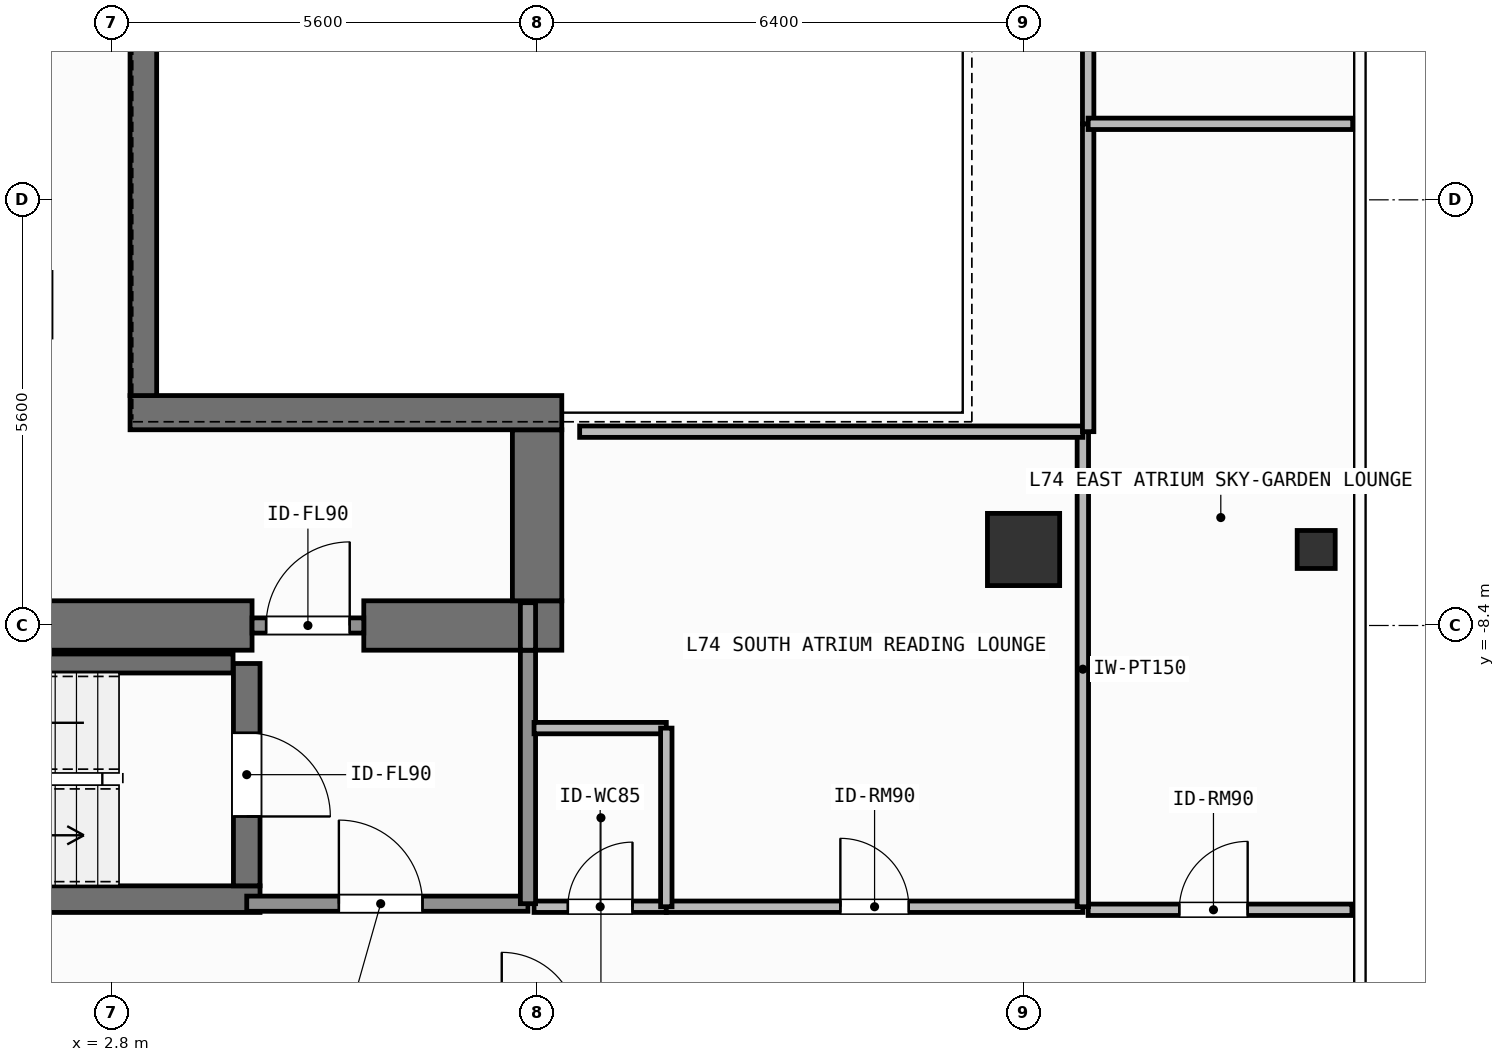
"""IFC4 building model, lengths in metres.
Left out: names, types, materials, properties, quantities, classifications, styles, units other than length and angle.
Written with IfcOpenShell. Run it as: python <this file> out.ifc"""

import sys

from ifc_helpers import new_model, si_unit, direction, frame, frame_2d, origin, origin_2d, place, context, subcontext, project, spatial, rectangle, hollow_rectangle, extrude, element, fill, save


model = new_model("IFC4")
c1 = context("Model", 3, precision=1e-05, world=origin(), true_north=direction((0.0, 1.0)))
c2 = subcontext(c1, "Body", "Model", "MODEL_VIEW")
j1 = project(units=[si_unit("LENGTHUNIT", "METRE"), si_unit("PLANEANGLEUNIT", "RADIAN")], contexts=[c1])
p1 = place(None, origin())
s1 = spatial("IfcSite", under=j1, at=p1, CompositionType="ELEMENT")
p2 = place(p1, origin())
s2 = spatial("IfcBuilding", under=s1, at=p2, CompositionType="ELEMENT")
p3 = place(p2, frame((0.0, 0.0, 301.5)))
s3 = spatial("IfcBuildingStorey", under=s2, at=p3, CompositionType="ELEMENT", Elevation=301.5)
p4 = place(p3, frame((-2.62, -8.4, 0.0), z_axis=(0.0, 0.0, 1.0), x_axis=(1.0, 0.0, 0.0)))
e1 = element("IfcWall", 1, at=p4, inside=s3, PredefinedType="SHEAR", context=c2, shape_type="SweptSolid", body=[
    extrude(rectangle(XDim=7.27, YDim=0.65, at=frame_2d((3.635, 0.0))), origin(), (0.0, 0.0, 1.0), 3.9),
])
p5 = place(p3, frame((6.12, -8.4, 0.0), z_axis=(0.0, 0.0, 1.0), x_axis=(1.0, 0.0, 0.0)))
e2 = element("IfcWall", 2, at=p5, inside=s3, PredefinedType="SHEAR", context=c2, shape_type="SweptSolid", body=[
    extrude(rectangle(XDim=2.605, YDim=0.65, at=frame_2d((1.302, 0.0))), origin(), (0.0, 0.0, 1.0), 3.9),
])
p6 = place(p3, frame((8.4, -8.075, 0.0), z_axis=(0.0, 0.0, 1.0), x_axis=(0.0, 1.0, 0.0)))
e3 = element("IfcWall", 3, at=p6, inside=s3, PredefinedType="SHEAR", context=c2, shape_type="SweptSolid", body=[
    extrude(rectangle(XDim=2.25, YDim=0.65, at=frame_2d((1.125, 0.0))), origin(), (0.0, 0.0, 1.0), 3.9),
])
p7 = place(p3, frame((3.045, -5.6, 0.0), z_axis=(0.0, 0.0, 1.0), x_axis=(1.0, 0.0, 0.0)))
e4 = element("IfcWall", 4, at=p7, inside=s3, PredefinedType="SHEAR", context=c2, shape_type="SweptSolid", body=[
    extrude(rectangle(XDim=5.68, YDim=0.45, at=frame_2d((2.84, 0.0))), origin(), (0.0, 0.0, 1.0), 3.9),
])
p8 = place(p3, frame((3.22, -5.375, 0.0), z_axis=(0.0, 0.0, 1.0), x_axis=(0.0, 1.0, 0.0)))
e5 = element("IfcWall", 5, at=p8, inside=s3, PredefinedType="SHEAR", context=c2, shape_type="SweptSolid", body=[
    extrude(rectangle(XDim=10.75, YDim=0.35, at=frame_2d((5.375, 0.0))), origin(), (0.0, 0.0, 1.0), 3.9),
])
p9 = place(p3, frame((-2.555, -12.0, 0.0), z_axis=(0.0, 0.0, 1.0), x_axis=(1.0, 0.0, 0.0)))
e6 = element("IfcWall", 6, at=p9, inside=s3, PredefinedType="SHEAR", context=c2, shape_type="SweptSolid", body=[
    extrude(rectangle(XDim=7.31, YDim=0.35, at=frame_2d((3.655, 0.0))), origin(), (0.0, 0.0, 1.0), 3.9),
])
p10 = place(p3, frame((-2.2, -8.9, 0.0), z_axis=(0.0, 0.0, 1.0), x_axis=(1.0, 0.0, 0.0)))
e7 = element("IfcWall", 7, at=p10, inside=s3, PredefinedType="SHEAR", context=c2, shape_type="SweptSolid", body=[
    extrude(rectangle(XDim=6.6, YDim=0.25, at=frame_2d((3.3, 0.0))), origin(), (0.0, 0.0, 1.0), 3.9),
])
p11 = place(p3, frame((4.58, -8.9, 0.0), z_axis=(0.0, 0.0, 1.0), x_axis=(0.0, -1.0, 0.0)))
e8 = element("IfcWall", 8, at=p11, inside=s3, PredefinedType="SHEAR", context=c2, shape_type="SweptSolid", body=[
    extrude(rectangle(XDim=2.925, YDim=0.35, at=frame_2d((1.462, 0.0))), origin(), (0.0, 0.0, 1.0), 3.9),
])
p12 = place(p11, frame((0.913, 0.0, 0.0)))
e9 = element("IfcOpeningElement", 9, at=p12, cuts=e8, PredefinedType="OPENING", context=c2, shape_type="SweptSolid", body=[
    extrude(rectangle(XDim=1.1, YDim=2.15, at=frame_2d((0.55, 1.075))), frame((0.0, 0.185, 0.0), z_axis=(0.0, -1.0, 0.0), x_axis=(1.0, 0.0, 0.0)), (0.0, 0.0, 1.0), 0.37),
])
p13 = place(p3, frame((14.8, -7.4, 0.0), z_axis=(0.0, 0.0, 1.0), x_axis=(1.0, 0.0, 0.0)))
e10 = element("IfcColumn", 10, at=p13, inside=s3, PredefinedType="COLUMN", context=c2, shape_type="SweptSolid", body=[
    extrude(rectangle(XDim=0.95, YDim=0.95, at=origin_2d()), origin(), (0.0, 0.0, 1.0), 3.9),
])
p14 = place(p3, frame((18.65, -7.4, 0.0), z_axis=(0.0, 0.0, 1.0), x_axis=(1.0, 0.0, 0.0)))
e11 = element("IfcColumn", 11, at=p14, inside=s3, PredefinedType="COLUMN", context=c2, shape_type="SweptSolid", body=[
    extrude(hollow_rectangle(XDim=0.5, YDim=0.5, WallThickness=0.025, at=origin_2d()), origin(), (0.0, 0.0, 1.0), 3.9),
])
p15 = place(p3, frame((4.58, -12.06, 0.0), z_axis=(0.0, 0.0, 1.0), x_axis=(1.0, 0.0, 0.0)))
e12 = element("IfcWall", 12, at=p15, inside=s3, PredefinedType="SOLIDWALL", context=c2, shape_type="SweptSolid", body=[
    extrude(rectangle(XDim=3.7, YDim=0.2, at=frame_2d((1.85, 0.0))), origin(), (0.0, 0.0, 1.0), 3.68),
])
p16 = place(p15, frame((1.212, 0.0, 0.0)))
e13 = element("IfcOpeningElement", 13, at=p16, cuts=e12, PredefinedType="OPENING", context=c2, shape_type="SweptSolid", body=[
    extrude(rectangle(XDim=1.1, YDim=2.15, at=frame_2d((0.55, 1.075))), frame((0.0, 0.11, 0.0), z_axis=(0.0, -1.0, 0.0), x_axis=(1.0, 0.0, 0.0)), (0.0, 0.0, 1.0), 0.22),
])
p17 = place(p3, frame((4.65, -8.4, 0.0), z_axis=(0.0, 0.0, 1.0), x_axis=(1.0, 0.0, 0.0)))
e14 = element("IfcWall", 14, at=p17, inside=s3, PredefinedType="SOLIDWALL", context=c2, shape_type="SweptSolid", body=[
    extrude(rectangle(XDim=1.47, YDim=0.2, at=frame_2d((0.735, 0.0))), origin(), (0.0, 0.0, 1.0), 2.92),
])
p18 = place(p17, frame((0.185, 0.0, 0.0)))
e15 = element("IfcOpeningElement", 15, at=p18, cuts=e14, PredefinedType="OPENING", context=c2, shape_type="SweptSolid", body=[
    extrude(rectangle(XDim=1.1, YDim=2.15, at=frame_2d((0.55, 1.075))), frame((0.0, 0.11, 0.0), z_axis=(0.0, -1.0, 0.0), x_axis=(1.0, 0.0, 0.0)), (0.0, 0.0, 1.0), 0.22),
])
p19 = place(p3, frame((8.36, -12.1, 0.0), z_axis=(0.0, 0.0, 1.0), x_axis=(1.0, 0.0, 0.0)))
e16 = element("IfcWall", 16, at=p19, inside=s3, PredefinedType="PARTITIONING", context=c2, shape_type="SweptSolid", body=[
    extrude(rectangle(XDim=1.74, YDim=0.15, at=frame_2d((0.87, 0.0))), origin(), (0.0, 0.0, 1.0), 3.68),
])
p20 = place(p19, frame((0.445, 0.0, 0.0)))
e17 = element("IfcOpeningElement", 17, at=p20, cuts=e16, PredefinedType="OPENING", context=c2, shape_type="SweptSolid", body=[
    extrude(rectangle(XDim=0.85, YDim=2.1, at=frame_2d((0.425, 1.05))), frame((0.0, 0.085, 0.0), z_axis=(0.0, -1.0, 0.0), x_axis=(1.0, 0.0, 0.0)), (0.0, 0.0, 1.0), 0.17),
])
p21 = place(p3, frame((10.1, -12.1, 0.0), z_axis=(0.0, 0.0, 1.0), x_axis=(1.0, 0.0, 0.0)))
e18 = element("IfcWall", 18, at=p21, inside=s3, PredefinedType="PARTITIONING", context=c2, shape_type="SweptSolid", body=[
    extrude(rectangle(XDim=5.48, YDim=0.15, at=frame_2d((2.74, 0.0))), origin(), (0.0, 0.0, 1.0), 3.68),
])
p22 = place(p21, frame((2.29, 0.0, 0.0)))
e19 = element("IfcOpeningElement", 19, at=p22, cuts=e18, PredefinedType="OPENING", context=c2, shape_type="SweptSolid", body=[
    extrude(rectangle(XDim=0.9, YDim=2.1, at=frame_2d((0.45, 1.05))), frame((0.0, 0.085, 0.0), z_axis=(0.0, -1.0, 0.0), x_axis=(1.0, 0.0, 0.0)), (0.0, 0.0, 1.0), 0.17),
])
p23 = place(p3, frame((15.65, -12.14, 0.0), z_axis=(0.0, 0.0, 1.0), x_axis=(1.0, 0.0, 0.0)))
e20 = element("IfcWall", 20, at=p23, inside=s3, PredefinedType="PARTITIONING", context=c2, shape_type="SweptSolid", body=[
    extrude(rectangle(XDim=3.47, YDim=0.15, at=frame_2d((1.735, 0.0))), origin(), (0.0, 0.0, 1.0), 3.68),
])
p24 = place(p23, frame((1.198, 0.0, 0.0)))
e21 = element("IfcOpeningElement", 21, at=p24, cuts=e20, PredefinedType="OPENING", context=c2, shape_type="SweptSolid", body=[
    extrude(rectangle(XDim=0.9, YDim=2.1, at=frame_2d((0.45, 1.05))), frame((0.0, 0.085, 0.0), z_axis=(0.0, -1.0, 0.0), x_axis=(1.0, 0.0, 0.0)), (0.0, 0.0, 1.0), 0.17),
])
p25 = place(p3, frame((8.28, -12.06, 0.0), z_axis=(0.0, 0.0, 1.0), x_axis=(0.0, 1.0, 0.0)))
e22 = element("IfcWall", 22, at=p25, inside=s3, PredefinedType="SOLIDWALL", context=c2, shape_type="SweptSolid", body=[
    extrude(rectangle(XDim=3.335, YDim=0.2, at=frame_2d((1.667, 0.0))), origin(), (0.0, 0.0, 1.0), 3.68),
])
p26 = place(p3, frame((8.28, -8.725, 0.0), z_axis=(0.0, 0.0, 1.0), x_axis=(0.0, 1.0, 0.0)))
e23 = element("IfcWall", 23, at=p26, inside=s3, PredefinedType="SOLIDWALL", context=c2, shape_type="SweptSolid", body=[
    extrude(rectangle(XDim=0.625, YDim=0.2, at=frame_2d((0.312, 0.0))), origin(), (0.0, 0.0, 1.0), 3.68),
])
p27 = place(p3, frame((8.36, -9.75, 0.0), z_axis=(0.0, 0.0, 1.0), x_axis=(1.0, 0.0, 0.0)))
e24 = element("IfcWall", 24, at=p27, inside=s3, PredefinedType="PARTITIONING", context=c2, shape_type="SweptSolid", body=[
    extrude(rectangle(XDim=1.74, YDim=0.15, at=frame_2d((0.87, 0.0))), origin(), (0.0, 0.0, 1.0), 3.68),
])
p28 = place(p3, frame((10.1, -12.1, 0.0), z_axis=(0.0, 0.0, 1.0), x_axis=(0.0, 1.0, 0.0)))
e25 = element("IfcWall", 25, at=p28, inside=s3, PredefinedType="PARTITIONING", context=c2, shape_type="SweptSolid", body=[
    extrude(rectangle(XDim=2.35, YDim=0.15, at=frame_2d((1.175, 0.0))), origin(), (0.0, 0.0, 1.0), 3.68),
])
p29 = place(p3, frame((15.58, -12.1, 0.0), z_axis=(0.0, 0.0, 1.0), x_axis=(0.0, 1.0, 0.0)))
e26 = element("IfcWall", 26, at=p29, inside=s3, PredefinedType="PARTITIONING", context=c2, shape_type="SweptSolid", body=[
    extrude(rectangle(XDim=6.25, YDim=0.15, at=frame_2d((3.125, 0.0))), origin(), (0.0, 0.0, 1.0), 3.68),
])
p30 = place(p3, frame((8.96, -5.85, 0.0), z_axis=(0.0, 0.0, 1.0), x_axis=(1.0, 0.0, 0.0)))
e27 = element("IfcWall", 27, at=p30, inside=s3, PredefinedType="PARTITIONING", context=c2, shape_type="SweptSolid", body=[
    extrude(rectangle(XDim=6.62, YDim=0.15, at=frame_2d((3.31, 0.0))), origin(), (0.0, 0.0, 1.0), 3.68),
])
p31 = place(p3, frame((15.65, -5.85, 0.0), z_axis=(0.0, 0.0, 1.0), x_axis=(0.0, 1.0, 0.0)))
e28 = element("IfcWall", 28, at=p31, inside=s3, PredefinedType="PARTITIONING", context=c2, shape_type="SweptSolid", body=[
    extrude(rectangle(XDim=4.05, YDim=0.15, at=frame_2d((2.025, 0.0))), origin(), (0.0, 0.0, 1.0), 3.68),
])
p32 = place(p3, frame((15.65, -1.8, 0.0), z_axis=(0.0, 0.0, 1.0), x_axis=(0.0, 1.0, 0.0)))
e29 = element("IfcWall", 29, at=p32, inside=s3, PredefinedType="PARTITIONING", context=c2, shape_type="SweptSolid", body=[
    extrude(rectangle(XDim=7.65, YDim=0.15, at=frame_2d((3.825, 0.0))), origin(), (0.0, 0.0, 1.0), 3.68),
])
p33 = place(p3, frame((15.65, -1.8, 0.0), z_axis=(0.0, 0.0, 1.0), x_axis=(1.0, 0.0, 0.0)))
e30 = element("IfcWall", 30, at=p33, inside=s3, PredefinedType="PARTITIONING", context=c2, shape_type="SweptSolid", body=[
    extrude(rectangle(XDim=3.48, YDim=0.15, at=frame_2d((1.74, 0.0))), origin(), (0.0, 0.0, 1.0), 3.68),
])
p34 = place(p12, origin())
e31 = element("IfcDoor", 31, at=p34, inside=s3, OperationType="SINGLE_SWING_RIGHT", PredefinedType="DOOR", context=c2, shape_type="SweptSolid", body=[
    extrude(rectangle(XDim=1.1, YDim=2.15, at=frame_2d((0.55, 1.075))), frame((0.0, 0.025, 0.0), z_axis=(0.0, -1.0, 0.0), x_axis=(1.0, 0.0, 0.0)), (0.0, 0.0, 1.0), 0.05),
])
fill(e9, e31)
p35 = place(p16, origin())
e32 = element("IfcDoor", 32, at=p35, inside=s3, OperationType="SINGLE_SWING_LEFT", PredefinedType="DOOR", context=c2, shape_type="SweptSolid", body=[
    extrude(rectangle(XDim=1.1, YDim=2.15, at=frame_2d((0.55, 1.075))), frame((0.0, 0.025, 0.0), z_axis=(0.0, -1.0, 0.0), x_axis=(1.0, 0.0, 0.0)), (0.0, 0.0, 1.0), 0.05),
])
fill(e13, e32)
p36 = place(p18, origin())
e33 = element("IfcDoor", 33, at=p36, inside=s3, OperationType="SINGLE_SWING_RIGHT", PredefinedType="DOOR", context=c2, shape_type="SweptSolid", body=[
    extrude(rectangle(XDim=1.1, YDim=2.15, at=frame_2d((0.55, 1.075))), frame((0.0, 0.025, 0.0), z_axis=(0.0, -1.0, 0.0), x_axis=(1.0, 0.0, 0.0)), (0.0, 0.0, 1.0), 0.05),
])
fill(e15, e33)
p37 = place(p20, origin())
e34 = element("IfcDoor", 34, at=p37, inside=s3, OperationType="SINGLE_SWING_RIGHT", PredefinedType="DOOR", context=c2, shape_type="SweptSolid", body=[
    extrude(rectangle(XDim=0.85, YDim=2.1, at=frame_2d((0.425, 1.05))), frame((0.0, 0.025, 0.0), z_axis=(0.0, -1.0, 0.0), x_axis=(1.0, 0.0, 0.0)), (0.0, 0.0, 1.0), 0.05),
])
fill(e17, e34)
p38 = place(p22, origin())
e35 = element("IfcDoor", 35, at=p38, inside=s3, OperationType="SINGLE_SWING_LEFT", PredefinedType="DOOR", context=c2, shape_type="SweptSolid", body=[
    extrude(rectangle(XDim=0.9, YDim=2.1, at=frame_2d((0.45, 1.05))), frame((0.0, 0.025, 0.0), z_axis=(0.0, -1.0, 0.0), x_axis=(1.0, 0.0, 0.0)), (0.0, 0.0, 1.0), 0.05),
])
fill(e19, e35)
p39 = place(p24, origin())
e36 = element("IfcDoor", 36, at=p39, inside=s3, OperationType="SINGLE_SWING_RIGHT", PredefinedType="DOOR", context=c2, shape_type="SweptSolid", body=[
    extrude(rectangle(XDim=0.9, YDim=2.1, at=frame_2d((0.45, 1.05))), frame((0.0, 0.025, 0.0), z_axis=(0.0, -1.0, 0.0), x_axis=(1.0, 0.0, 0.0)), (0.0, 0.0, 1.0), 0.05),
])
fill(e21, e36)
save(model, sys.argv[1])
